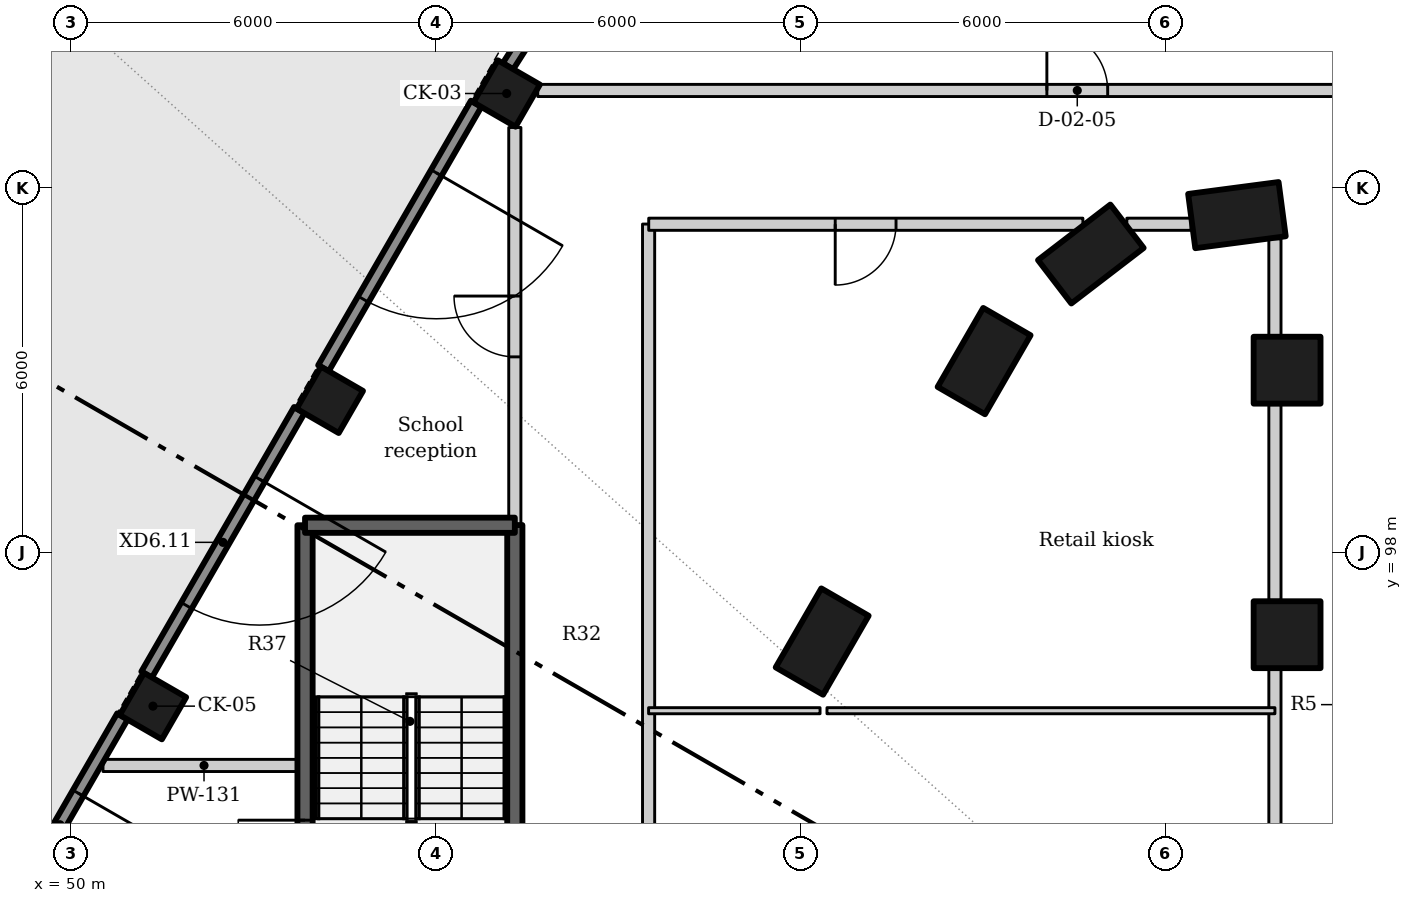
"""IFC4 building model, lengths in metres.
Left out: names, types, materials, properties, quantities, classifications, styles, units other than length and angle.
Written with IfcOpenShell. Run it as: python <this file> out.ifc"""

import sys

from ifc_helpers import new_model, si_unit, direction, frame, frame_2d, origin, origin_2d, place, context, subcontext, project, spatial, rectangle, extrude, element, fill, save


model = new_model("IFC4")
c1 = context("Model", 3, precision=1e-05, world=origin(), true_north=direction((0.0, 1.0)))
c2 = subcontext(c1, "Body", "Model", "MODEL_VIEW")
j1 = project(units=[si_unit("LENGTHUNIT", "METRE"), si_unit("PLANEANGLEUNIT", "RADIAN")], contexts=[c1])
p1 = place(None, origin())
s1 = spatial("IfcSite", under=j1, at=p1, CompositionType="ELEMENT")
p2 = place(p1, origin())
s2 = spatial("IfcBuilding", under=s1, at=p2, CompositionType="ELEMENT")
p3 = place(p2, origin())
s3 = spatial("IfcBuildingStorey", under=s2, at=p3, CompositionType="ELEMENT", Elevation=0.0)
for number, where, z_axis, x_axis in (
    (1, (69.175, 103.55, -1.8), (0.0, 0.0, 1.0), (-0.991, -0.131, 0.0)),
    (2, (66.773, 102.91, -1.8), (0.0, 0.0, 1.0), (-0.793, -0.609, 0.0)),
    (3, (65.018, 101.149, -1.8), (0.0, 0.0, 1.0), (-0.5, -0.866, 0.0)),
    (4, (62.354, 96.537, -1.8), (0.0, 0.0, 1.0), (-0.5, -0.866, 0.0)),
):
    element("IfcColumn", number, at=place(p3, frame(where, z_axis=z_axis, x_axis=x_axis)), inside=s3, PredefinedType="COLUMN", context=c2, shape_type="SweptSolid", body=[
        extrude(rectangle(XDim=1.5, YDim=0.9, at=origin_2d()), origin(), (0.0, 0.0, 1.0), 8.4),
    ])
for number, where, z_axis, x_axis in (
    (5, (70.0, 101.0, -1.8), (0.0, 0.0, 1.0), (0.0, -1.0, 0.0)),
    (6, (70.0, 96.65, -1.8), (0.0, 0.0, 1.0), (0.0, -1.0, 0.0)),
):
    element("IfcColumn", number, at=place(p3, frame(where, z_axis=z_axis, x_axis=x_axis)), inside=s3, PredefinedType="COLUMN", context=c2, shape_type="SweptSolid", body=[
        extrude(rectangle(XDim=1.1, YDim=1.1, at=origin_2d()), origin(), (0.0, 0.0, 1.0), 8.4),
    ])
for number, where, z_axis, x_axis in (
    (7, (57.166, 105.55, -1.8), (0.0, 0.0, 1.0), (-0.5, -0.866, 0.0)),
    (8, (54.257, 100.513, -1.8), (0.0, 0.0, 1.0), (-0.5, -0.866, 0.0)),
    (9, (51.349, 95.475, -1.8), (0.0, 0.0, 1.0), (-0.5, -0.866, 0.0)),
):
    element("IfcColumn", number, at=place(p3, frame(where, z_axis=z_axis, x_axis=x_axis)), inside=s3, PredefinedType="COLUMN", context=c2, shape_type="SweptSolid", body=[
        extrude(rectangle(XDim=0.8, YDim=0.8, at=origin_2d()), origin(), (0.0, 0.0, 1.0), 8.4),
    ])
p4 = place(p3, frame((56.665, 105.382, 0.0), z_axis=(0.0, 0.0, 1.0), x_axis=(-0.500011252833, -0.866018906861, 0.0)))
e10 = element("IfcWall", 10, at=p4, inside=s3, PredefinedType="SOLIDWALL", context=c2, shape_type="SweptSolid", body=[
    extrude(rectangle(XDim=5.025, YDim=0.2, at=frame_2d((2.512, 0.0))), origin(), (0.0, 0.0, 1.0), 5.4),
])
p5 = place(p4, frame((1.312, 0.0, 0.0)))
e11 = element("IfcOpeningElement", 11, at=p5, cuts=e10, PredefinedType="OPENING", context=c2, shape_type="SweptSolid", body=[
    extrude(rectangle(XDim=2.4, YDim=2.7, at=frame_2d((1.2, 1.35))), frame((0.0, 0.11, 0.0), z_axis=(0.0, -1.0, 0.0), x_axis=(1.0, 0.0, 0.0)), (0.0, 0.0, 1.0), 0.22),
])
p6 = place(p3, frame((53.756, 100.345, 0.0), z_axis=(0.0, 0.0, 1.0), x_axis=(-0.500011252833, -0.866018906861, 0.0)))
e12 = element("IfcWall", 12, at=p6, inside=s3, PredefinedType="SOLIDWALL", context=c2, shape_type="SweptSolid", body=[
    extrude(rectangle(XDim=5.025, YDim=0.2, at=frame_2d((2.512, 0.0))), origin(), (0.0, 0.0, 1.0), 5.4),
])
p7 = place(p6, frame((1.312, 0.0, 0.0)))
e13 = element("IfcOpeningElement", 13, at=p7, cuts=e12, PredefinedType="OPENING", context=c2, shape_type="SweptSolid", body=[
    extrude(rectangle(XDim=2.4, YDim=2.7, at=frame_2d((1.2, 1.35))), frame((0.0, 0.11, 0.0), z_axis=(0.0, -1.0, 0.0), x_axis=(1.0, 0.0, 0.0)), (0.0, 0.0, 1.0), 0.22),
])
p8 = place(p3, frame((50.848, 95.307, 0.0), z_axis=(0.0, 0.0, 1.0), x_axis=(-0.499953773667, -0.866052090925, 0.0)))
e14 = element("IfcWall", 14, at=p8, inside=s3, PredefinedType="SOLIDWALL", context=c2, shape_type="SweptSolid", body=[
    extrude(rectangle(XDim=5.025, YDim=0.2, at=frame_2d((2.512, 0.0))), origin(), (0.0, 0.0, 1.0), 5.4),
])
p9 = place(p8, frame((1.458, 0.0, 0.0)))
e15 = element("IfcOpeningElement", 15, at=p9, cuts=e14, PredefinedType="OPENING", context=c2, shape_type="SweptSolid", body=[
    extrude(rectangle(XDim=1.2, YDim=2.4, at=frame_2d((0.6, 1.2))), frame((0.0, 0.11, 0.0), z_axis=(0.0, -1.0, 0.0), x_axis=(1.0, 0.0, 0.0)), (0.0, 0.0, 1.0), 0.22),
])
p10 = place(p3, frame((59.911, 110.274, 0.0), z_axis=(0.0, 0.0, 1.0), x_axis=(-0.537224370512, -0.843439372882, 0.0)))
e16 = element("IfcWall", 16, at=p10, inside=s3, PredefinedType="SOLIDWALL", context=c2, shape_type="SweptSolid", body=[
    extrude(rectangle(XDim=5.071, YDim=0.2, at=frame_2d((2.535, 0.0))), origin(), (0.0, 0.0, 1.0), 5.4),
])
p11 = place(p10, frame((1.035, 0.0, 0.0)))
e17 = element("IfcOpeningElement", 17, at=p11, cuts=e16, PredefinedType="OPENING", context=c2, shape_type="SweptSolid", body=[
    extrude(rectangle(XDim=3.0, YDim=3.0, at=frame_2d((1.5, 1.5))), frame((0.0, 0.11, 0.0), z_axis=(0.0, -1.0, 0.0), x_axis=(1.0, 0.0, 0.0)), (0.0, 0.0, 1.0), 0.22),
])
p12 = place(p3, frame((57.677, 105.6, 0.0), z_axis=(0.0, 0.0, 1.0), x_axis=(1.0, 0.0, 0.0)))
e18 = element("IfcWall", 18, at=p12, inside=s3, PredefinedType="PARTITIONING", context=c2, shape_type="SweptSolid", body=[
    extrude(rectangle(XDim=20.723, YDim=0.2, at=frame_2d((10.362, 0.0))), origin(), (0.0, 0.0, 1.0), 6.3),
])
p13 = place(p12, frame((8.373, 0.0, 0.0)))
e19 = element("IfcOpeningElement", 19, at=p13, cuts=e18, PredefinedType="OPENING", context=c2, shape_type="SweptSolid", body=[
    extrude(rectangle(XDim=1.0, YDim=2.1, at=frame_2d((0.5, 1.05))), frame((0.0, 0.11, 0.0), z_axis=(0.0, -1.0, 0.0), x_axis=(1.0, 0.0, 0.0)), (0.0, 0.0, 1.0), 0.22),
])
p14 = place(p3, frame((57.3, 98.453, -1.8), z_axis=(0.0, 0.0, 1.0), x_axis=(0.0, -1.0, 0.0)))
e20 = element("IfcWall", 20, at=p14, inside=s3, PredefinedType="SHEAR", context=c2, shape_type="SweptSolid", body=[
    extrude(rectangle(XDim=6.456, YDim=0.25, at=frame_2d((3.228, 0.0))), origin(), (0.0, 0.0, 1.0), 8.1),
])
p15 = place(p14, frame((5.306, 0.0, 1.8)))
e21 = element("IfcOpeningElement", 21, at=p15, cuts=e20, PredefinedType="OPENING", context=c2, shape_type="SweptSolid", body=[
    extrude(rectangle(XDim=0.9, YDim=2.1, at=frame_2d((0.45, 1.05))), frame((0.0, 0.135, 0.0), z_axis=(0.0, -1.0, 0.0), x_axis=(1.0, 0.0, 0.0)), (0.0, 0.0, 1.0), 0.27),
])
p16 = place(p3, frame((57.3, 98.447, 0.0), z_axis=(0.0, 0.0, 1.0), x_axis=(0.0, 1.0, 0.0)))
e22 = element("IfcWall", 22, at=p16, inside=s3, PredefinedType="PARTITIONING", context=c2, shape_type="SweptSolid", body=[
    extrude(rectangle(XDim=6.544, YDim=0.2, at=frame_2d((3.272, 0.0))), origin(), (0.0, 0.0, 1.0), 6.3),
])
p17 = place(p16, frame((2.772, 0.0, 0.0)))
e23 = element("IfcOpeningElement", 23, at=p17, cuts=e22, PredefinedType="OPENING", context=c2, shape_type="SweptSolid", body=[
    extrude(rectangle(XDim=1.0, YDim=2.1, at=frame_2d((0.5, 1.05))), frame((0.0, 0.11, 0.0), z_axis=(0.0, -1.0, 0.0), x_axis=(1.0, 0.0, 0.0)), (0.0, 0.0, 1.0), 0.22),
])
p18 = place(p3, frame((59.5, 92.53, 0.0), z_axis=(0.0, 0.0, 1.0), x_axis=(0.0, 1.0, 0.0)))
e24 = element("IfcWall", 24, at=p18, inside=s3, PredefinedType="PARTITIONING", context=c2, shape_type="SweptSolid", body=[
    extrude(rectangle(XDim=10.873, YDim=0.2, at=frame_2d((5.437, 0.0))), origin(), (0.0, 0.0, 1.0), 6.3),
])
p19 = place(p3, frame((66.642, 103.4, 0.0), z_axis=(0.0, 0.0, 1.0), x_axis=(-1.0, 0.0, 0.0)))
e25 = element("IfcWall", 25, at=p19, inside=s3, PredefinedType="PARTITIONING", context=c2, shape_type="SweptSolid", body=[
    extrude(rectangle(XDim=7.14, YDim=0.2, at=frame_2d((3.57, 0.0))), origin(), (0.0, 0.0, 1.0), 6.3),
])
p20 = place(p19, frame((3.073, 0.0, 0.0)))
e26 = element("IfcOpeningElement", 26, at=p20, cuts=e25, PredefinedType="OPENING", context=c2, shape_type="SweptSolid", body=[
    extrude(rectangle(XDim=1.0, YDim=2.1, at=frame_2d((0.5, 1.05))), frame((0.0, 0.11, 0.0), z_axis=(0.0, -1.0, 0.0), x_axis=(1.0, 0.0, 0.0)), (0.0, 0.0, 1.0), 0.22),
])
p21 = place(p3, frame((67.365, 103.4, 0.0), z_axis=(0.0, 0.0, 1.0), x_axis=(1.0, 0.0, 0.0)))
e27 = element("IfcWall", 27, at=p21, inside=s3, PredefinedType="PARTITIONING", context=c2, shape_type="SweptSolid", body=[
    extrude(rectangle(XDim=1.057, YDim=0.2, at=frame_2d((0.528, 0.0))), origin(), (0.0, 0.0, 1.0), 5.38),
])
for number, where, z_axis, x_axis in (
    (28, (69.8, 92.867, 0.0), (0.0, 0.0, 1.0), (0.0, 1.0, 0.0)),
    (29, (69.8, 97.217, 0.0), (0.0, 0.0, 1.0), (0.0, 1.0, 0.0)),
):
    element("IfcWall", number, at=place(p3, frame(where, z_axis=z_axis, x_axis=x_axis)), inside=s3, PredefinedType="PARTITIONING", context=c2, shape_type="SweptSolid", body=[
        extrude(rectangle(XDim=3.216, YDim=0.2, at=frame_2d((1.608, 0.0))), origin(), (0.0, 0.0, 1.0), 5.53),
    ])
p22 = place(p3, frame((69.8, 101.567, 0.0), z_axis=(0.0, 0.0, 1.0), x_axis=(0.0, 1.0, 0.0)))
e30 = element("IfcWall", 30, at=p22, inside=s3, PredefinedType="PARTITIONING", context=c2, shape_type="SweptSolid", body=[
    extrude(rectangle(XDim=1.594, YDim=0.2, at=frame_2d((0.797, 0.0))), origin(), (0.0, 0.0, 1.0), 6.3),
])
p23 = place(p3, frame((53.85, 92.0, -1.8), z_axis=(0.0, 0.0, 1.0), x_axis=(0.0, 1.0, 0.0)))
e31 = element("IfcWall", 31, at=p23, inside=s3, PredefinedType="SHEAR", context=c2, shape_type="SweptSolid", body=[
    extrude(rectangle(XDim=6.45, YDim=0.25, at=frame_2d((3.225, 0.0))), origin(), (0.0, 0.0, 1.0), 8.1),
])
p24 = place(p23, frame((0.5, 0.0, 1.8)))
e32 = element("IfcOpeningElement", 32, at=p24, cuts=e31, PredefinedType="OPENING", context=c2, shape_type="SweptSolid", body=[
    extrude(rectangle(XDim=1.1, YDim=2.1, at=frame_2d((0.55, 1.05))), frame((0.0, 0.135, 0.0), z_axis=(0.0, -1.0, 0.0), x_axis=(1.0, 0.0, 0.0)), (0.0, 0.0, 1.0), 0.27),
])
p25 = place(p3, frame((50.527, 94.5, 0.0), z_axis=(0.0, 0.0, 1.0), x_axis=(1.0, 0.0, 0.0)))
e33 = element("IfcWall", 33, at=p25, inside=s3, PredefinedType="PARTITIONING", context=c2, shape_type="SweptSolid", body=[
    extrude(rectangle(XDim=3.323, YDim=0.2, at=frame_2d((1.661, 0.0))), origin(), (0.0, 0.0, 1.0), 5.53),
])
p26 = place(p3, frame((53.85, 98.45, -1.8), z_axis=(0.0, 0.0, 1.0), x_axis=(1.0, 0.0, 0.0)))
e34 = element("IfcWall", 34, at=p26, inside=s3, PredefinedType="SHEAR", context=c2, shape_type="SweptSolid", body=[
    extrude(rectangle(XDim=3.45, YDim=0.25, at=frame_2d((1.725, 0.0))), origin(), (0.0, 0.0, 1.0), 8.1),
])
p27 = place(p3, frame((59.5, 95.4, 0.0), z_axis=(0.0, 0.0, 1.0), x_axis=(1.0, 0.0, 0.0)))
e35 = element("IfcWall", 35, at=p27, inside=s3, PredefinedType="PARTITIONING", context=c2, shape_type="SweptSolid", body=[
    extrude(rectangle(XDim=2.82, YDim=0.1, at=frame_2d((1.41, 0.0))), origin(), (0.0, 0.0, 1.0), 5.38),
])
p28 = place(p3, frame((62.434, 95.4, 0.0), z_axis=(0.0, 0.0, 1.0), x_axis=(1.0, 0.0, 0.0)))
e36 = element("IfcWall", 36, at=p28, inside=s3, PredefinedType="PARTITIONING", context=c2, shape_type="SweptSolid", body=[
    extrude(rectangle(XDim=7.366, YDim=0.1, at=frame_2d((3.683, 0.0))), origin(), (0.0, 0.0, 1.0), 6.3),
])
p29 = place(p5, frame((2.4, 0.0, 0.0), z_axis=(0.0, 0.0, 1.0), x_axis=(-1.0, 0.0, 0.0)))
e37 = element("IfcDoor", 37, at=p29, inside=s3, OperationType="DOUBLE_DOOR_DOUBLE_SWING", PredefinedType="DOOR", context=c2, shape_type="SweptSolid", body=[
    extrude(rectangle(XDim=2.4, YDim=2.7, at=frame_2d((1.2, 1.35))), frame((0.0, 0.025, 0.0), z_axis=(0.0, -1.0, 0.0), x_axis=(1.0, 0.0, 0.0)), (0.0, 0.0, 1.0), 0.05),
])
fill(e11, e37)
p30 = place(p7, frame((2.4, 0.0, 0.0), z_axis=(0.0, 0.0, 1.0), x_axis=(-1.0, 0.0, 0.0)))
e38 = element("IfcDoor", 38, at=p30, inside=s3, OperationType="DOUBLE_DOOR_DOUBLE_SWING", PredefinedType="DOOR", context=c2, shape_type="SweptSolid", body=[
    extrude(rectangle(XDim=2.4, YDim=2.7, at=frame_2d((1.2, 1.35))), frame((0.0, 0.025, 0.0), z_axis=(0.0, -1.0, 0.0), x_axis=(1.0, 0.0, 0.0)), (0.0, 0.0, 1.0), 0.05),
])
fill(e13, e38)
p31 = place(p9, frame((1.2, 0.0, 0.0), z_axis=(0.0, 0.0, 1.0), x_axis=(-1.0, 0.0, 0.0)))
e39 = element("IfcDoor", 39, at=p31, inside=s3, OperationType="SINGLE_SWING_LEFT", PredefinedType="DOOR", context=c2, shape_type="SweptSolid", body=[
    extrude(rectangle(XDim=1.2, YDim=2.4, at=frame_2d((0.6, 1.2))), frame((0.0, 0.025, 0.0), z_axis=(0.0, -1.0, 0.0), x_axis=(1.0, 0.0, 0.0)), (0.0, 0.0, 1.0), 0.05),
])
fill(e15, e39)
p32 = place(p24, origin())
e40 = element("IfcDoor", 40, at=p32, inside=s3, OperationType="SINGLE_SWING_RIGHT", PredefinedType="DOOR", context=c2, shape_type="SweptSolid", body=[
    extrude(rectangle(XDim=1.1, YDim=2.1, at=frame_2d((0.55, 1.05))), frame((0.0, 0.025, 0.0), z_axis=(0.0, -1.0, 0.0), x_axis=(1.0, 0.0, 0.0)), (0.0, 0.0, 1.0), 0.05),
])
fill(e32, e40)
p33 = place(p17, origin())
e41 = element("IfcDoor", 41, at=p33, inside=s3, OperationType="SINGLE_SWING_RIGHT", PredefinedType="DOOR", context=c2, shape_type="SweptSolid", body=[
    extrude(rectangle(XDim=1.0, YDim=2.1, at=frame_2d((0.5, 1.05))), frame((0.0, 0.025, 0.0), z_axis=(0.0, -1.0, 0.0), x_axis=(1.0, 0.0, 0.0)), (0.0, 0.0, 1.0), 0.05),
])
fill(e23, e41)
p34 = place(p13, origin())
e42 = element("IfcDoor", 42, at=p34, inside=s3, OperationType="SINGLE_SWING_LEFT", PredefinedType="DOOR", context=c2, shape_type="SweptSolid", body=[
    extrude(rectangle(XDim=1.0, YDim=2.1, at=frame_2d((0.5, 1.05))), frame((0.0, 0.025, 0.0), z_axis=(0.0, -1.0, 0.0), x_axis=(1.0, 0.0, 0.0)), (0.0, 0.0, 1.0), 0.05),
])
fill(e19, e42)
p35 = place(p20, origin())
e43 = element("IfcDoor", 43, at=p35, inside=s3, OperationType="SINGLE_SWING_RIGHT", PredefinedType="DOOR", context=c2, shape_type="SweptSolid", body=[
    extrude(rectangle(XDim=1.0, YDim=2.1, at=frame_2d((0.5, 1.05))), frame((0.0, 0.025, 0.0), z_axis=(0.0, -1.0, 0.0), x_axis=(1.0, 0.0, 0.0)), (0.0, 0.0, 1.0), 0.05),
])
fill(e26, e43)
save(model, sys.argv[1])
